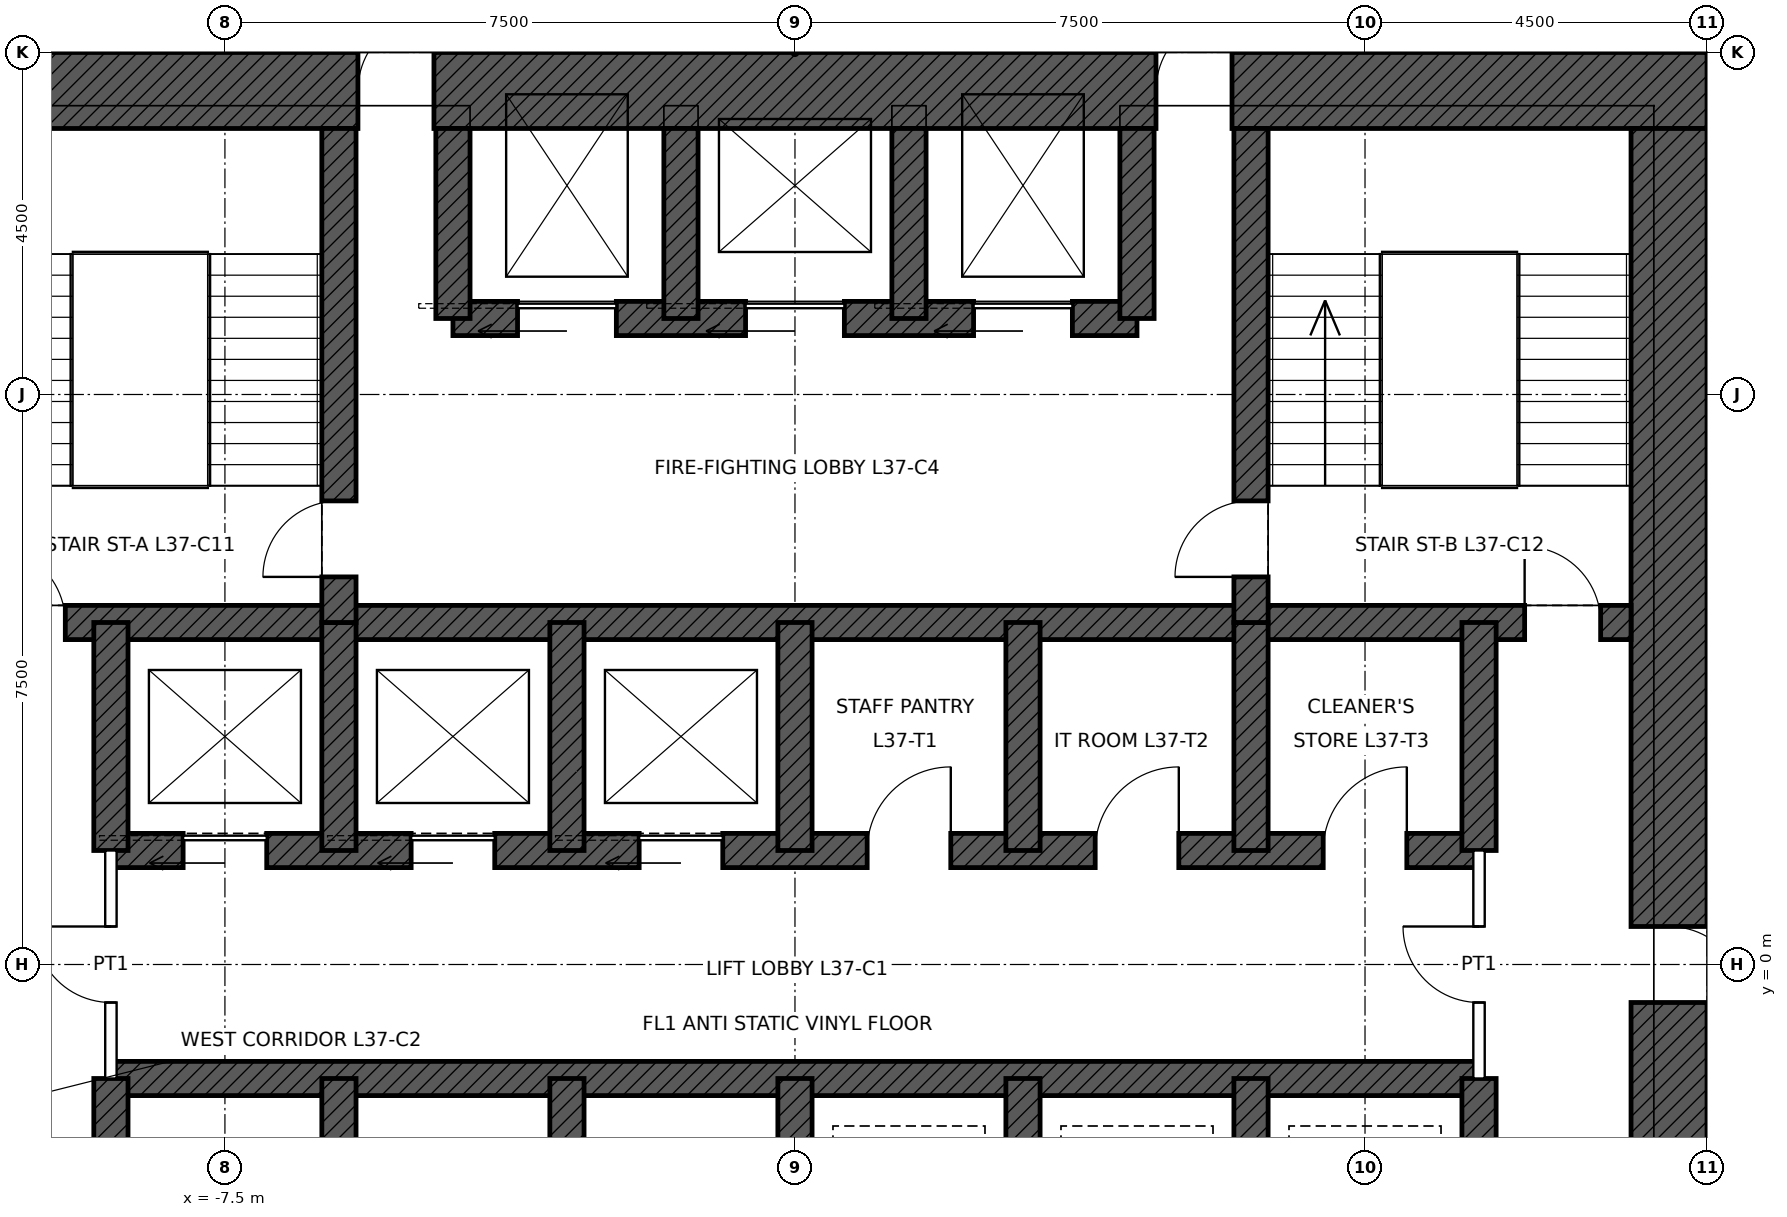
"""IFC4 building model, lengths in metres.
Left out: names, types, materials, properties, quantities, classifications, styles, units other than length and angle.
Written with IfcOpenShell. Run it as: python <this file> out.ifc"""

import sys

from ifc_helpers import new_model, si_unit, direction, frame, frame_2d, origin, place, context, subcontext, project, spatial, rectangle, extrude, element, fill, save


model = new_model("IFC4")
c1 = context("Model", 3, precision=1e-05, world=origin(), true_north=direction((0.0, 1.0)))
c2 = subcontext(c1, "Body", "Model", "MODEL_VIEW")
j1 = project(units=[si_unit("LENGTHUNIT", "METRE"), si_unit("PLANEANGLEUNIT", "RADIAN")], contexts=[c1])
p1 = place(None, origin())
s1 = spatial("IfcSite", under=j1, at=p1, CompositionType="ELEMENT")
p2 = place(p1, origin())
s2 = spatial("IfcBuilding", under=s1, at=p2, CompositionType="ELEMENT")
p3 = place(p2, frame((0.0, 0.0, 181.9)))
s3 = spatial("IfcBuildingStorey", under=s2, at=p3, CompositionType="ELEMENT", Elevation=181.9)
p4 = place(p3, frame((-12.0, 11.5, 0.0), z_axis=(0.0, 0.0, 1.0), x_axis=(1.0, 0.0, 0.0)))
e1 = element("IfcWall", 1, at=p4, inside=s3, PredefinedType="SHEAR", context=c2, shape_type="SweptSolid", body=[
    extrude(rectangle(XDim=24.0, YDim=1.0, at=frame_2d((12.0, 0.0))), origin(), (0.0, 0.0, 1.0), 4.0),
])
p5 = place(p4, frame((6.25, 0.0, 0.0)))
e2 = element("IfcOpeningElement", 2, at=p5, cuts=e1, PredefinedType="OPENING", context=c2, shape_type="SweptSolid", body=[
    extrude(rectangle(XDim=1.0, YDim=2.4, at=frame_2d((0.5, 1.2))), frame((0.0, 0.51, 0.0), z_axis=(0.0, -1.0, 0.0), x_axis=(1.0, 0.0, 0.0)), (0.0, 0.0, 1.0), 1.02),
])
p6 = place(p4, frame((16.75, 0.0, 0.0)))
e3 = element("IfcOpeningElement", 3, at=p6, cuts=e1, PredefinedType="OPENING", context=c2, shape_type="SweptSolid", body=[
    extrude(rectangle(XDim=1.0, YDim=2.4, at=frame_2d((0.5, 1.2))), frame((0.0, 0.51, 0.0), z_axis=(0.0, -1.0, 0.0), x_axis=(1.0, 0.0, 0.0)), (0.0, 0.0, 1.0), 1.02),
])
p7 = place(p3, frame((11.5, 11.0, 0.0), z_axis=(0.0, 0.0, 1.0), x_axis=(0.0, -1.0, 0.0)))
e4 = element("IfcWall", 4, at=p7, inside=s3, PredefinedType="SHEAR", context=c2, shape_type="SweptSolid", body=[
    extrude(rectangle(XDim=22.0, YDim=1.0, at=frame_2d((11.0, 0.0))), origin(), (0.0, 0.0, 1.0), 4.0),
])
p8 = place(p7, frame((10.5, 0.0, 0.0)))
e5 = element("IfcOpeningElement", 5, at=p8, cuts=e4, PredefinedType="OPENING", context=c2, shape_type="SweptSolid", body=[
    extrude(rectangle(XDim=1.0, YDim=2.4, at=frame_2d((0.5, 1.2))), frame((0.0, 0.51, 0.0), z_axis=(0.0, -1.0, 0.0), x_axis=(1.0, 0.0, 0.0)), (0.0, 0.0, 1.0), 1.02),
])
p9 = place(p3, frame((-11.0, 4.5, 0.0), z_axis=(0.0, 0.0, 1.0), x_axis=(1.0, 0.0, 0.0)))
e6 = element("IfcWall", 6, at=p9, inside=s3, PredefinedType="SHEAR", context=c2, shape_type="SweptSolid", body=[
    extrude(rectangle(XDim=22.0, YDim=0.45, at=frame_2d((11.0, 0.0))), origin(), (0.0, 0.0, 1.0), 4.0),
])
p10 = place(p9, frame((0.4, 0.0, 0.0)))
e7 = element("IfcOpeningElement", 7, at=p10, cuts=e6, PredefinedType="OPENING", context=c2, shape_type="SweptSolid", body=[
    extrude(rectangle(XDim=1.0, YDim=2.1, at=frame_2d((0.5, 1.05))), frame((0.0, 0.235, 0.0), z_axis=(0.0, -1.0, 0.0), x_axis=(1.0, 0.0, 0.0)), (0.0, 0.0, 1.0), 0.47),
])
p11 = place(p9, frame((20.6, 0.0, 0.0)))
e8 = element("IfcOpeningElement", 8, at=p11, cuts=e6, PredefinedType="OPENING", context=c2, shape_type="SweptSolid", body=[
    extrude(rectangle(XDim=1.0, YDim=2.1, at=frame_2d((0.5, 1.05))), frame((0.0, 0.235, 0.0), z_axis=(0.0, -1.0, 0.0), x_axis=(1.0, 0.0, 0.0)), (0.0, 0.0, 1.0), 0.47),
])
p12 = place(p3, frame((-9.0, 1.5, 0.0), z_axis=(0.0, 0.0, 1.0), x_axis=(1.0, 0.0, 0.0)))
e9 = element("IfcWall", 9, at=p12, inside=s3, PredefinedType="SHEAR", context=c2, shape_type="SweptSolid", body=[
    extrude(rectangle(XDim=18.0, YDim=0.45, at=frame_2d((9.0, 0.0))), origin(), (0.0, 0.0, 1.0), 4.0),
])
p13 = place(p12, frame((0.95, 0.0, 0.0)))
e10 = element("IfcOpeningElement", 10, at=p13, cuts=e9, PredefinedType="OPENING", context=c2, shape_type="SweptSolid", body=[
    extrude(rectangle(XDim=1.1, YDim=2.1, at=frame_2d((0.55, 1.05))), frame((0.0, 0.235, 0.0), z_axis=(0.0, -1.0, 0.0), x_axis=(1.0, 0.0, 0.0)), (0.0, 0.0, 1.0), 0.47),
])
p14 = place(p12, frame((3.95, 0.0, 0.0)))
e11 = element("IfcOpeningElement", 11, at=p14, cuts=e9, PredefinedType="OPENING", context=c2, shape_type="SweptSolid", body=[
    extrude(rectangle(XDim=1.1, YDim=2.1, at=frame_2d((0.55, 1.05))), frame((0.0, 0.235, 0.0), z_axis=(0.0, -1.0, 0.0), x_axis=(1.0, 0.0, 0.0)), (0.0, 0.0, 1.0), 0.47),
])
p15 = place(p12, frame((6.95, 0.0, 0.0)))
e12 = element("IfcOpeningElement", 12, at=p15, cuts=e9, PredefinedType="OPENING", context=c2, shape_type="SweptSolid", body=[
    extrude(rectangle(XDim=1.1, YDim=2.1, at=frame_2d((0.55, 1.05))), frame((0.0, 0.235, 0.0), z_axis=(0.0, -1.0, 0.0), x_axis=(1.0, 0.0, 0.0)), (0.0, 0.0, 1.0), 0.47),
])
p16 = place(p12, frame((9.95, 0.0, 0.0)))
e13 = element("IfcOpeningElement", 13, at=p16, cuts=e9, PredefinedType="OPENING", context=c2, shape_type="SweptSolid", body=[
    extrude(rectangle(XDim=1.1, YDim=2.1, at=frame_2d((0.55, 1.05))), frame((0.0, 0.235, 0.0), z_axis=(0.0, -1.0, 0.0), x_axis=(1.0, 0.0, 0.0)), (0.0, 0.0, 1.0), 0.47),
])
p17 = place(p12, frame((12.95, 0.0, 0.0)))
e14 = element("IfcOpeningElement", 14, at=p17, cuts=e9, PredefinedType="OPENING", context=c2, shape_type="SweptSolid", body=[
    extrude(rectangle(XDim=1.1, YDim=2.1, at=frame_2d((0.55, 1.05))), frame((0.0, 0.235, 0.0), z_axis=(0.0, -1.0, 0.0), x_axis=(1.0, 0.0, 0.0)), (0.0, 0.0, 1.0), 0.47),
])
p18 = place(p12, frame((15.95, 0.0, 0.0)))
e15 = element("IfcOpeningElement", 15, at=p18, cuts=e9, PredefinedType="OPENING", context=c2, shape_type="SweptSolid", body=[
    extrude(rectangle(XDim=1.1, YDim=2.1, at=frame_2d((0.55, 1.05))), frame((0.0, 0.235, 0.0), z_axis=(0.0, -1.0, 0.0), x_axis=(1.0, 0.0, 0.0)), (0.0, 0.0, 1.0), 0.47),
])
p19 = place(p3, frame((-9.0, -1.5, 0.0), z_axis=(0.0, 0.0, 1.0), x_axis=(1.0, 0.0, 0.0)))
e16 = element("IfcWall", 16, at=p19, inside=s3, PredefinedType="SHEAR", context=c2, shape_type="SweptSolid", body=[
    extrude(rectangle(XDim=18.0, YDim=0.45, at=frame_2d((9.0, 0.0))), origin(), (0.0, 0.0, 1.0), 4.0),
])
p20 = place(p3, frame((-4.5, 8.5, 0.0), z_axis=(0.0, 0.0, 1.0), x_axis=(1.0, 0.0, 0.0)))
e17 = element("IfcWall", 17, at=p20, inside=s3, PredefinedType="SHEAR", context=c2, shape_type="SweptSolid", body=[
    extrude(rectangle(XDim=9.0, YDim=0.45, at=frame_2d((4.5, 0.0))), origin(), (0.0, 0.0, 1.0), 4.0),
])
p21 = place(p20, frame((0.85, 0.0, 0.0)))
e18 = element("IfcOpeningElement", 18, at=p21, cuts=e17, PredefinedType="OPENING", context=c2, shape_type="SweptSolid", body=[
    extrude(rectangle(XDim=1.3, YDim=2.4, at=frame_2d((0.65, 1.2))), frame((0.0, 0.235, 0.0), z_axis=(0.0, -1.0, 0.0), x_axis=(1.0, 0.0, 0.0)), (0.0, 0.0, 1.0), 0.47),
])
p22 = place(p20, frame((6.85, 0.0, 0.0)))
e19 = element("IfcOpeningElement", 19, at=p22, cuts=e17, PredefinedType="OPENING", context=c2, shape_type="SweptSolid", body=[
    extrude(rectangle(XDim=1.3, YDim=2.4, at=frame_2d((0.65, 1.2))), frame((0.0, 0.235, 0.0), z_axis=(0.0, -1.0, 0.0), x_axis=(1.0, 0.0, 0.0)), (0.0, 0.0, 1.0), 0.47),
])
p23 = place(p20, frame((3.85, 0.0, 0.0)))
e20 = element("IfcOpeningElement", 20, at=p23, cuts=e17, PredefinedType="OPENING", context=c2, shape_type="SweptSolid", body=[
    extrude(rectangle(XDim=1.3, YDim=2.4, at=frame_2d((0.65, 1.2))), frame((0.0, 0.235, 0.0), z_axis=(0.0, -1.0, 0.0), x_axis=(1.0, 0.0, 0.0)), (0.0, 0.0, 1.0), 0.47),
])
for number, where, z_axis, x_axis in (
    (21, (-9.0, 1.5, 0.0), (0.0, 0.0, 1.0), (0.0, 1.0, 0.0)),
    (22, (9.0, 1.5, 0.0), (0.0, 0.0, 1.0), (0.0, 1.0, 0.0)),
    (23, (-9.0, -4.5, 0.0), (0.0, 0.0, 1.0), (0.0, 1.0, 0.0)),
    (24, (9.0, -4.5, 0.0), (0.0, 0.0, 1.0), (0.0, 1.0, 0.0)),
    (25, (-6.0, 1.5, 0.0), (0.0, 0.0, 1.0), (0.0, 1.0, 0.0)),
    (26, (-3.0, 1.5, 0.0), (0.0, 0.0, 1.0), (0.0, 1.0, 0.0)),
    (27, (0.0, 1.5, 0.0), (0.0, 0.0, 1.0), (0.0, 1.0, 0.0)),
    (28, (3.0, 1.5, 0.0), (0.0, 0.0, 1.0), (0.0, 1.0, 0.0)),
    (29, (6.0, 1.5, 0.0), (0.0, 0.0, 1.0), (0.0, 1.0, 0.0)),
    (30, (-6.0, -4.5, 0.0), (0.0, 0.0, 1.0), (0.0, 1.0, 0.0)),
    (31, (-3.0, -4.5, 0.0), (0.0, 0.0, 1.0), (0.0, 1.0, 0.0)),
    (32, (0.0, -4.5, 0.0), (0.0, 0.0, 1.0), (0.0, 1.0, 0.0)),
    (33, (3.0, -4.5, 0.0), (0.0, 0.0, 1.0), (0.0, 1.0, 0.0)),
    (34, (6.0, -4.5, 0.0), (0.0, 0.0, 1.0), (0.0, 1.0, 0.0)),
):
    element("IfcWall", number, at=place(p3, frame(where, z_axis=z_axis, x_axis=x_axis)), inside=s3, PredefinedType="SHEAR", context=c2, shape_type="SweptSolid", body=[
        extrude(rectangle(XDim=3.0, YDim=0.45, at=frame_2d((1.5, 0.0))), origin(), (0.0, 0.0, 1.0), 4.0),
    ])
p24 = place(p3, frame((-6.0, 4.5, 0.0), z_axis=(0.0, 0.0, 1.0), x_axis=(0.0, 1.0, 0.0)))
e35 = element("IfcWall", 35, at=p24, inside=s3, PredefinedType="SHEAR", context=c2, shape_type="SweptSolid", body=[
    extrude(rectangle(XDim=6.5, YDim=0.45, at=frame_2d((3.25, 0.0))), origin(), (0.0, 0.0, 1.0), 4.0),
])
p25 = place(p24, frame((0.6, 0.0, 0.0)))
e36 = element("IfcOpeningElement", 36, at=p25, cuts=e35, PredefinedType="OPENING", context=c2, shape_type="SweptSolid", body=[
    extrude(rectangle(XDim=1.0, YDim=2.1, at=frame_2d((0.5, 1.05))), frame((0.0, 0.235, 0.0), z_axis=(0.0, -1.0, 0.0), x_axis=(1.0, 0.0, 0.0)), (0.0, 0.0, 1.0), 0.47),
])
p26 = place(p3, frame((6.0, 4.5, 0.0), z_axis=(0.0, 0.0, 1.0), x_axis=(0.0, 1.0, 0.0)))
e37 = element("IfcWall", 37, at=p26, inside=s3, PredefinedType="SHEAR", context=c2, shape_type="SweptSolid", body=[
    extrude(rectangle(XDim=6.5, YDim=0.45, at=frame_2d((3.25, 0.0))), origin(), (0.0, 0.0, 1.0), 4.0),
])
p27 = place(p26, frame((0.6, 0.0, 0.0)))
e38 = element("IfcOpeningElement", 38, at=p27, cuts=e37, PredefinedType="OPENING", context=c2, shape_type="SweptSolid", body=[
    extrude(rectangle(XDim=1.0, YDim=2.1, at=frame_2d((0.5, 1.05))), frame((0.0, 0.235, 0.0), z_axis=(0.0, -1.0, 0.0), x_axis=(1.0, 0.0, 0.0)), (0.0, 0.0, 1.0), 0.47),
])
for number, where, z_axis, x_axis in (
    (39, (-4.5, 8.5, 0.0), (0.0, 0.0, 1.0), (0.0, 1.0, 0.0)),
    (40, (4.5, 8.5, 0.0), (0.0, 0.0, 1.0), (0.0, 1.0, 0.0)),
    (41, (-1.5, 8.5, 0.0), (0.0, 0.0, 1.0), (0.0, 1.0, 0.0)),
    (42, (1.5, 8.5, 0.0), (0.0, 0.0, 1.0), (0.0, 1.0, 0.0)),
):
    element("IfcWall", number, at=place(p3, frame(where, z_axis=z_axis, x_axis=x_axis)), inside=s3, PredefinedType="SHEAR", context=c2, shape_type="SweptSolid", body=[
        extrude(rectangle(XDim=2.5, YDim=0.45, at=frame_2d((1.25, 0.0))), origin(), (0.0, 0.0, 1.0), 4.0),
    ])
p28 = place(p3, frame((-9.0, -1.5, 0.0), z_axis=(0.0, 0.0, 1.0), x_axis=(0.0, 1.0, 0.0)))
e43 = element("IfcWall", 43, at=p28, inside=s3, PredefinedType="PARTITIONING", context=c2, shape_type="SweptSolid", body=[
    extrude(rectangle(XDim=3.0, YDim=0.15, at=frame_2d((1.5, 0.0))), origin(), (0.0, 0.0, 1.0), 3.75),
])
p29 = place(p28, frame((1.0, 0.0, 0.0)))
e44 = element("IfcOpeningElement", 44, at=p29, cuts=e43, PredefinedType="OPENING", context=c2, shape_type="SweptSolid", body=[
    extrude(rectangle(XDim=1.0, YDim=2.4, at=frame_2d((0.5, 1.2))), frame((0.0, 0.085, 0.0), z_axis=(0.0, -1.0, 0.0), x_axis=(1.0, 0.0, 0.0)), (0.0, 0.0, 1.0), 0.17),
])
p30 = place(p3, frame((9.0, -1.5, 0.0), z_axis=(0.0, 0.0, 1.0), x_axis=(0.0, 1.0, 0.0)))
e45 = element("IfcWall", 45, at=p30, inside=s3, PredefinedType="PARTITIONING", context=c2, shape_type="SweptSolid", body=[
    extrude(rectangle(XDim=3.0, YDim=0.15, at=frame_2d((1.5, 0.0))), origin(), (0.0, 0.0, 1.0), 3.75),
])
p31 = place(p30, frame((1.0, 0.0, 0.0)))
e46 = element("IfcOpeningElement", 46, at=p31, cuts=e45, PredefinedType="OPENING", context=c2, shape_type="SweptSolid", body=[
    extrude(rectangle(XDim=1.0, YDim=2.4, at=frame_2d((0.5, 1.2))), frame((0.0, 0.085, 0.0), z_axis=(0.0, -1.0, 0.0), x_axis=(1.0, 0.0, 0.0)), (0.0, 0.0, 1.0), 0.17),
])
p32 = place(p10, origin())
e47 = element("IfcDoor", 47, at=p32, inside=s3, OperationType="SINGLE_SWING_LEFT", PredefinedType="DOOR", context=c2, shape_type="SweptSolid", body=[
    extrude(rectangle(XDim=1.0, YDim=2.1, at=frame_2d((0.5, 1.05))), frame((0.0, 0.025, 0.0), z_axis=(0.0, -1.0, 0.0), x_axis=(1.0, 0.0, 0.0)), (0.0, 0.0, 1.0), 0.05),
])
fill(e7, e47)
p33 = place(p11, origin())
e48 = element("IfcDoor", 48, at=p33, inside=s3, OperationType="SINGLE_SWING_LEFT", PredefinedType="DOOR", context=c2, shape_type="SweptSolid", body=[
    extrude(rectangle(XDim=1.0, YDim=2.1, at=frame_2d((0.5, 1.05))), frame((0.0, 0.025, 0.0), z_axis=(0.0, -1.0, 0.0), x_axis=(1.0, 0.0, 0.0)), (0.0, 0.0, 1.0), 0.05),
])
fill(e8, e48)
p34 = place(p25, origin())
e49 = element("IfcDoor", 49, at=p34, inside=s3, OperationType="SINGLE_SWING_LEFT", PredefinedType="DOOR", context=c2, shape_type="SweptSolid", body=[
    extrude(rectangle(XDim=1.0, YDim=2.1, at=frame_2d((0.5, 1.05))), frame((0.0, 0.025, 0.0), z_axis=(0.0, -1.0, 0.0), x_axis=(1.0, 0.0, 0.0)), (0.0, 0.0, 1.0), 0.05),
])
fill(e36, e49)
p35 = place(p27, origin())
e50 = element("IfcDoor", 50, at=p35, inside=s3, OperationType="SINGLE_SWING_LEFT", PredefinedType="DOOR", context=c2, shape_type="SweptSolid", body=[
    extrude(rectangle(XDim=1.0, YDim=2.1, at=frame_2d((0.5, 1.05))), frame((0.0, 0.025, 0.0), z_axis=(0.0, -1.0, 0.0), x_axis=(1.0, 0.0, 0.0)), (0.0, 0.0, 1.0), 0.05),
])
fill(e38, e50)
p36 = place(p5, origin())
e51 = element("IfcDoor", 51, at=p36, inside=s3, OperationType="SINGLE_SWING_RIGHT", PredefinedType="DOOR", context=c2, shape_type="SweptSolid", body=[
    extrude(rectangle(XDim=1.0, YDim=2.4, at=frame_2d((0.5, 1.2))), frame((0.0, 0.485, 0.0), z_axis=(0.0, -1.0, 0.0), x_axis=(1.0, 0.0, 0.0)), (0.0, 0.0, 1.0), 0.05),
])
fill(e2, e51)
p37 = place(p6, origin())
e52 = element("IfcDoor", 52, at=p37, inside=s3, OperationType="SINGLE_SWING_RIGHT", PredefinedType="DOOR", context=c2, shape_type="SweptSolid", body=[
    extrude(rectangle(XDim=1.0, YDim=2.4, at=frame_2d((0.5, 1.2))), frame((0.0, 0.485, 0.0), z_axis=(0.0, -1.0, 0.0), x_axis=(1.0, 0.0, 0.0)), (0.0, 0.0, 1.0), 0.05),
])
fill(e3, e52)
p38 = place(p8, origin())
e53 = element("IfcDoor", 53, at=p38, inside=s3, OperationType="SINGLE_SWING_RIGHT", PredefinedType="DOOR", context=c2, shape_type="SweptSolid", body=[
    extrude(rectangle(XDim=1.0, YDim=2.4, at=frame_2d((0.5, 1.2))), frame((0.0, 0.485, 0.0), z_axis=(0.0, -1.0, 0.0), x_axis=(1.0, 0.0, 0.0)), (0.0, 0.0, 1.0), 0.05),
])
fill(e5, e53)
p39 = place(p21, origin())
e54 = element("IfcDoor", 54, at=p39, inside=s3, OperationType="SLIDING_TO_LEFT", PredefinedType="DOOR", context=c2, shape_type="SweptSolid", body=[
    extrude(rectangle(XDim=1.3, YDim=2.4, at=frame_2d((0.65, 1.2))), frame((0.0, 0.025, 0.0), z_axis=(0.0, -1.0, 0.0), x_axis=(1.0, 0.0, 0.0)), (0.0, 0.0, 1.0), 0.05),
])
fill(e18, e54)
p40 = place(p22, origin())
e55 = element("IfcDoor", 55, at=p40, inside=s3, OperationType="SLIDING_TO_LEFT", PredefinedType="DOOR", context=c2, shape_type="SweptSolid", body=[
    extrude(rectangle(XDim=1.3, YDim=2.4, at=frame_2d((0.65, 1.2))), frame((0.0, 0.025, 0.0), z_axis=(0.0, -1.0, 0.0), x_axis=(1.0, 0.0, 0.0)), (0.0, 0.0, 1.0), 0.05),
])
fill(e19, e55)
p41 = place(p23, origin())
e56 = element("IfcDoor", 56, at=p41, inside=s3, OperationType="SLIDING_TO_LEFT", PredefinedType="DOOR", context=c2, shape_type="SweptSolid", body=[
    extrude(rectangle(XDim=1.3, YDim=2.4, at=frame_2d((0.65, 1.2))), frame((0.0, 0.025, 0.0), z_axis=(0.0, -1.0, 0.0), x_axis=(1.0, 0.0, 0.0)), (0.0, 0.0, 1.0), 0.05),
])
fill(e20, e56)
p42 = place(p13, origin())
e57 = element("IfcDoor", 57, at=p42, inside=s3, OperationType="SLIDING_TO_LEFT", PredefinedType="DOOR", context=c2, shape_type="SweptSolid", body=[
    extrude(rectangle(XDim=1.1, YDim=2.1, at=frame_2d((0.55, 1.05))), frame((0.0, 0.025, 0.0), z_axis=(0.0, -1.0, 0.0), x_axis=(1.0, 0.0, 0.0)), (0.0, 0.0, 1.0), 0.05),
])
fill(e10, e57)
p43 = place(p14, origin())
e58 = element("IfcDoor", 58, at=p43, inside=s3, OperationType="SLIDING_TO_LEFT", PredefinedType="DOOR", context=c2, shape_type="SweptSolid", body=[
    extrude(rectangle(XDim=1.1, YDim=2.1, at=frame_2d((0.55, 1.05))), frame((0.0, 0.025, 0.0), z_axis=(0.0, -1.0, 0.0), x_axis=(1.0, 0.0, 0.0)), (0.0, 0.0, 1.0), 0.05),
])
fill(e11, e58)
p44 = place(p15, origin())
e59 = element("IfcDoor", 59, at=p44, inside=s3, OperationType="SLIDING_TO_LEFT", PredefinedType="DOOR", context=c2, shape_type="SweptSolid", body=[
    extrude(rectangle(XDim=1.1, YDim=2.1, at=frame_2d((0.55, 1.05))), frame((0.0, 0.025, 0.0), z_axis=(0.0, -1.0, 0.0), x_axis=(1.0, 0.0, 0.0)), (0.0, 0.0, 1.0), 0.05),
])
fill(e12, e59)
p45 = place(p29, origin())
e60 = element("IfcDoor", 60, at=p45, inside=s3, OperationType="SINGLE_SWING_RIGHT", PredefinedType="DOOR", context=c2, shape_type="SweptSolid", body=[
    extrude(rectangle(XDim=1.0, YDim=2.4, at=frame_2d((0.5, 1.2))), frame((0.0, 0.025, 0.0), z_axis=(0.0, -1.0, 0.0), x_axis=(1.0, 0.0, 0.0)), (0.0, 0.0, 1.0), 0.05),
])
fill(e44, e60)
p46 = place(p31, origin())
e61 = element("IfcDoor", 61, at=p46, inside=s3, OperationType="SINGLE_SWING_RIGHT", PredefinedType="DOOR", context=c2, shape_type="SweptSolid", body=[
    extrude(rectangle(XDim=1.0, YDim=2.4, at=frame_2d((0.5, 1.2))), frame((0.0, 0.025, 0.0), z_axis=(0.0, -1.0, 0.0), x_axis=(1.0, 0.0, 0.0)), (0.0, 0.0, 1.0), 0.05),
])
fill(e46, e61)
p47 = place(p16, origin())
e62 = element("IfcDoor", 62, at=p47, inside=s3, OperationType="SINGLE_SWING_RIGHT", PredefinedType="DOOR", context=c2, shape_type="SweptSolid", body=[
    extrude(rectangle(XDim=1.1, YDim=2.1, at=frame_2d((0.55, 1.05))), frame((0.0, 0.025, 0.0), z_axis=(0.0, -1.0, 0.0), x_axis=(1.0, 0.0, 0.0)), (0.0, 0.0, 1.0), 0.05),
])
fill(e13, e62)
p48 = place(p17, origin())
e63 = element("IfcDoor", 63, at=p48, inside=s3, OperationType="SINGLE_SWING_RIGHT", PredefinedType="DOOR", context=c2, shape_type="SweptSolid", body=[
    extrude(rectangle(XDim=1.1, YDim=2.1, at=frame_2d((0.55, 1.05))), frame((0.0, 0.025, 0.0), z_axis=(0.0, -1.0, 0.0), x_axis=(1.0, 0.0, 0.0)), (0.0, 0.0, 1.0), 0.05),
])
fill(e14, e63)
p49 = place(p18, origin())
e64 = element("IfcDoor", 64, at=p49, inside=s3, OperationType="SINGLE_SWING_RIGHT", PredefinedType="DOOR", context=c2, shape_type="SweptSolid", body=[
    extrude(rectangle(XDim=1.1, YDim=2.1, at=frame_2d((0.55, 1.05))), frame((0.0, 0.025, 0.0), z_axis=(0.0, -1.0, 0.0), x_axis=(1.0, 0.0, 0.0)), (0.0, 0.0, 1.0), 0.05),
])
fill(e15, e64)
save(model, sys.argv[1])
